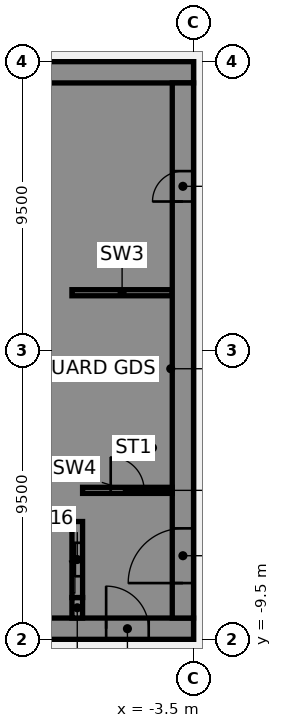
"""IFC4 building model, lengths in metres.
Left out: names, types, materials, properties, quantities, classifications, styles, units other than length and angle.
Written with IfcOpenShell. Run it as: python <this file> out.ifc"""

import sys

from ifc_helpers import new_model, si_unit, direction, frame, frame_2d, origin, place, context, subcontext, project, spatial, polyline, rectangle, outline, extrude, element, fill, save


model = new_model("IFC4")
c1 = context("Model", 3, precision=1e-05, world=origin(), true_north=direction((0.0, 1.0)))
c2 = subcontext(c1, "Body", "Model", "MODEL_VIEW")
j1 = project(units=[si_unit("LENGTHUNIT", "METRE"), si_unit("PLANEANGLEUNIT", "RADIAN")], contexts=[c1])
p1 = place(None, origin())
s1 = spatial("IfcSite", under=j1, at=p1, CompositionType="ELEMENT")
p2 = place(p1, origin())
s2 = spatial("IfcBuilding", under=s1, at=p2, CompositionType="ELEMENT")
p3 = place(p2, frame((0.0, 0.0, 71.5)))
s3 = spatial("IfcBuildingStorey", under=s2, at=p3, CompositionType="ELEMENT", Elevation=71.5)
p4 = place(p3, frame((-16.5, -9.15, 0.0), z_axis=(0.0, 0.0, 1.0), x_axis=(1.0, 0.0, 0.0)))
e1 = element("IfcWall", 1, at=p4, inside=s3, PredefinedType="SHEAR", context=c2, shape_type="SweptSolid", body=[
    extrude(rectangle(XDim=13.0, YDim=0.7, at=frame_2d((6.5, 0.0))), origin(), (0.0, 0.0, 1.0), 3.61),
])
p5 = place(p4, frame((4.15, 0.0, 0.0)))
e2 = element("IfcOpeningElement", 2, at=p5, cuts=e1, PredefinedType="OPENING", context=c2, shape_type="SweptSolid", body=[
    extrude(rectangle(XDim=1.4, YDim=2.1, at=frame_2d((0.7, 1.05))), frame((0.0, 0.36, 0.0), z_axis=(0.0, -1.0, 0.0), x_axis=(1.0, 0.0, 0.0)), (0.0, 0.0, 1.0), 0.72),
])
p6 = place(p4, frame((10.125, 0.0, 0.0)))
e3 = element("IfcOpeningElement", 3, at=p6, cuts=e1, PredefinedType="OPENING", context=c2, shape_type="SweptSolid", body=[
    extrude(rectangle(XDim=1.4, YDim=2.1, at=frame_2d((0.7, 1.05))), frame((0.0, 0.36, 0.0), z_axis=(0.0, -1.0, 0.0), x_axis=(1.0, 0.0, 0.0)), (0.0, 0.0, 1.0), 0.72),
])
p7 = place(p3, frame((-16.5, 9.15, 0.0), z_axis=(0.0, 0.0, 1.0), x_axis=(1.0, 0.0, 0.0)))
e4 = element("IfcWall", 4, at=p7, inside=s3, PredefinedType="SHEAR", context=c2, shape_type="SweptSolid", body=[
    extrude(rectangle(XDim=13.0, YDim=0.7, at=frame_2d((6.5, 0.0))), origin(), (0.0, 0.0, 1.0), 3.61),
])
p8 = place(p3, origin())
e5 = element("IfcWall", 5, at=p8, inside=s3, PredefinedType="SHEAR", context=c2, shape_type="SweptSolid", body=[
    extrude(outline(polyline([(-9.8, -5.375), (-9.8, -5.625), (-7.5, -5.625), (-7.15, -5.625), (-7.15, 8.8), (-7.5, 8.8), (-9.8, 8.8), (-9.8, 8.125), (-7.5, 8.125), (-7.5, 5.625), (-9.8, 5.625), (-9.8, 5.375), (-7.5, 5.375), (-7.5, 2.875), (-9.8, 2.875), (-9.8, 2.625), (-7.5, 2.625), (-7.5, 0.125), (-9.8, 0.125), (-9.8, -0.125), (-7.5, -0.125), (-7.5, -2.625), (-9.8, -2.625), (-9.8, -2.875), (-7.5, -2.875), (-7.5, -5.375), (-9.8, -5.375)])), origin(), (0.0, 0.0, 1.0), 3.61),
])
p9 = place(p3, origin())
e6 = element("IfcWall", 6, at=p9, inside=s3, PredefinedType="SHEAR", context=c2, shape_type="SweptSolid", body=[
    extrude(outline(polyline([(-7.5, -8.125), (-9.55, -8.125), (-9.55, -5.625), (-9.8, -5.625), (-9.8, -8.125), (-9.8, -8.8), (-7.5, -8.8), (-7.5, -8.125)])), origin(), (0.0, 0.0, 1.0), 3.61),
])
p10 = place(p3, frame((-7.325, -8.8, 0.0), z_axis=(0.0, 0.0, 1.0), x_axis=(0.0, 1.0, 0.0)))
e7 = element("IfcWall", 7, at=p10, inside=s3, PredefinedType="SHEAR", context=c2, shape_type="SweptSolid", body=[
    extrude(rectangle(XDim=0.675, YDim=0.35, at=frame_2d((0.337, 0.0))), origin(), (0.0, 0.0, 1.0), 3.61),
])
p11 = place(p3, frame((-7.5, 1.9, 0.0), z_axis=(0.0, 0.0, 1.0), x_axis=(1.0, 0.0, 0.0)))
e8 = element("IfcWall", 8, at=p11, inside=s3, PredefinedType="SHEAR", context=c2, shape_type="SweptSolid", body=[
    extrude(rectangle(XDim=3.3, YDim=0.2, at=frame_2d((1.65, 0.0))), origin(), (0.0, 0.0, 1.0), 3.61),
])
p12 = place(p3, frame((-7.325, -8.125, 0.0), z_axis=(0.0, 0.0, 1.0), x_axis=(0.0, 1.0, 0.0)))
e9 = element("IfcWall", 9, at=p12, inside=s3, PredefinedType="SHEAR", context=c2, shape_type="SweptSolid", body=[
    extrude(rectangle(XDim=2.5, YDim=0.35, at=frame_2d((1.25, 0.0))), origin(), (0.0, 0.0, 1.0), 3.61),
])
p13 = place(p12, frame((0.7, 0.0, 0.0)))
e10 = element("IfcOpeningElement", 10, at=p13, cuts=e9, PredefinedType="OPENING", context=c2, shape_type="SweptSolid", body=[
    extrude(rectangle(XDim=1.1, YDim=2.1, at=frame_2d((0.55, 1.05))), frame((0.0, 0.185, 0.0), z_axis=(0.0, -1.0, 0.0), x_axis=(1.0, 0.0, 0.0)), (0.0, 0.0, 1.0), 0.37),
])
p14 = place(p3, frame((-3.85, -8.8, 0.0), z_axis=(0.0, 0.0, 1.0), x_axis=(0.0, 1.0, 0.0)))
e11 = element("IfcWall", 11, at=p14, inside=s3, PredefinedType="SHEAR", context=c2, shape_type="SweptSolid", body=[
    extrude(rectangle(XDim=17.6, YDim=0.7, at=frame_2d((8.8, 0.0))), origin(), (0.0, 0.0, 1.0), 3.61),
])
p15 = place(p14, frame((1.15, 0.0, 0.0)))
e12 = element("IfcOpeningElement", 12, at=p15, cuts=e11, PredefinedType="OPENING", context=c2, shape_type="SweptSolid", body=[
    extrude(rectangle(XDim=1.8, YDim=2.1, at=frame_2d((0.9, 1.05))), frame((0.0, 0.36, 0.0), z_axis=(0.0, -1.0, 0.0), x_axis=(1.0, 0.0, 0.0)), (0.0, 0.0, 1.0), 0.72),
])
p16 = place(p14, frame((13.7, 0.0, 0.0)))
e13 = element("IfcOpeningElement", 13, at=p16, cuts=e11, PredefinedType="OPENING", context=c2, shape_type="SweptSolid", body=[
    extrude(rectangle(XDim=1.0, YDim=2.1, at=frame_2d((0.5, 1.05))), frame((0.0, 0.36, 0.0), z_axis=(0.0, -1.0, 0.0), x_axis=(1.0, 0.0, 0.0)), (0.0, 0.0, 1.0), 0.72),
])
p17 = place(p3, frame((-7.15, -4.6, 0.0), z_axis=(0.0, 0.0, 1.0), x_axis=(1.0, 0.0, 0.0)))
e14 = element("IfcWall", 14, at=p17, inside=s3, PredefinedType="SHEAR", context=c2, shape_type="SweptSolid", body=[
    extrude(rectangle(XDim=2.95, YDim=0.2, at=frame_2d((1.475, 0.0))), origin(), (0.0, 0.0, 1.0), 3.61),
])
p18 = place(p17, frame((0.925, 0.0, 0.0)))
e15 = element("IfcOpeningElement", 15, at=p18, cuts=e14, PredefinedType="OPENING", context=c2, shape_type="SweptSolid", body=[
    extrude(rectangle(XDim=1.1, YDim=2.1, at=frame_2d((0.55, 1.05))), frame((0.0, 0.11, 0.0), z_axis=(0.0, -1.0, 0.0), x_axis=(1.0, 0.0, 0.0)), (0.0, 0.0, 1.0), 0.22),
])
p19 = place(p6, origin())
e16 = element("IfcDoor", 16, at=p19, inside=s3, OperationType="SINGLE_SWING_LEFT", PredefinedType="DOOR", context=c2, shape_type="SweptSolid", body=[
    extrude(rectangle(XDim=1.4, YDim=2.1, at=frame_2d((0.7, 1.05))), frame((0.0, 0.025, 0.0), z_axis=(0.0, -1.0, 0.0), x_axis=(1.0, 0.0, 0.0)), (0.0, 0.0, 1.0), 0.05),
])
fill(e3, e16)
p20 = place(p15, origin())
e17 = element("IfcDoor", 17, at=p20, inside=s3, OperationType="SINGLE_SWING_LEFT", PredefinedType="DOOR", context=c2, shape_type="SweptSolid", body=[
    extrude(rectangle(XDim=1.8, YDim=2.1, at=frame_2d((0.9, 1.05))), frame((0.0, 0.025, 0.0), z_axis=(0.0, -1.0, 0.0), x_axis=(1.0, 0.0, 0.0)), (0.0, 0.0, 1.0), 0.05),
])
fill(e12, e17)
p21 = place(p16, origin())
e18 = element("IfcDoor", 18, at=p21, inside=s3, OperationType="SINGLE_SWING_LEFT", PredefinedType="DOOR", context=c2, shape_type="SweptSolid", body=[
    extrude(rectangle(XDim=1.0, YDim=2.1, at=frame_2d((0.5, 1.05))), frame((0.0, 0.025, 0.0), z_axis=(0.0, -1.0, 0.0), x_axis=(1.0, 0.0, 0.0)), (0.0, 0.0, 1.0), 0.05),
])
fill(e13, e18)
p22 = place(p18, origin())
e19 = element("IfcDoor", 19, at=p22, inside=s3, OperationType="SINGLE_SWING_LEFT", PredefinedType="DOOR", context=c2, shape_type="SweptSolid", body=[
    extrude(rectangle(XDim=1.1, YDim=2.1, at=frame_2d((0.55, 1.05))), frame((0.0, 0.025, 0.0), z_axis=(0.0, -1.0, 0.0), x_axis=(1.0, 0.0, 0.0)), (0.0, 0.0, 1.0), 0.05),
])
fill(e15, e19)
p23 = place(p13, origin())
e20 = element("IfcDoor", 20, at=p23, inside=s3, OperationType="SLIDING_TO_LEFT", PredefinedType="DOOR", context=c2, shape_type="SweptSolid", body=[
    extrude(rectangle(XDim=1.1, YDim=2.1, at=frame_2d((0.55, 1.05))), frame((0.0, 0.025, 0.0), z_axis=(0.0, -1.0, 0.0), x_axis=(1.0, 0.0, 0.0)), (0.0, 0.0, 1.0), 0.05),
])
fill(e10, e20)
save(model, sys.argv[1])
